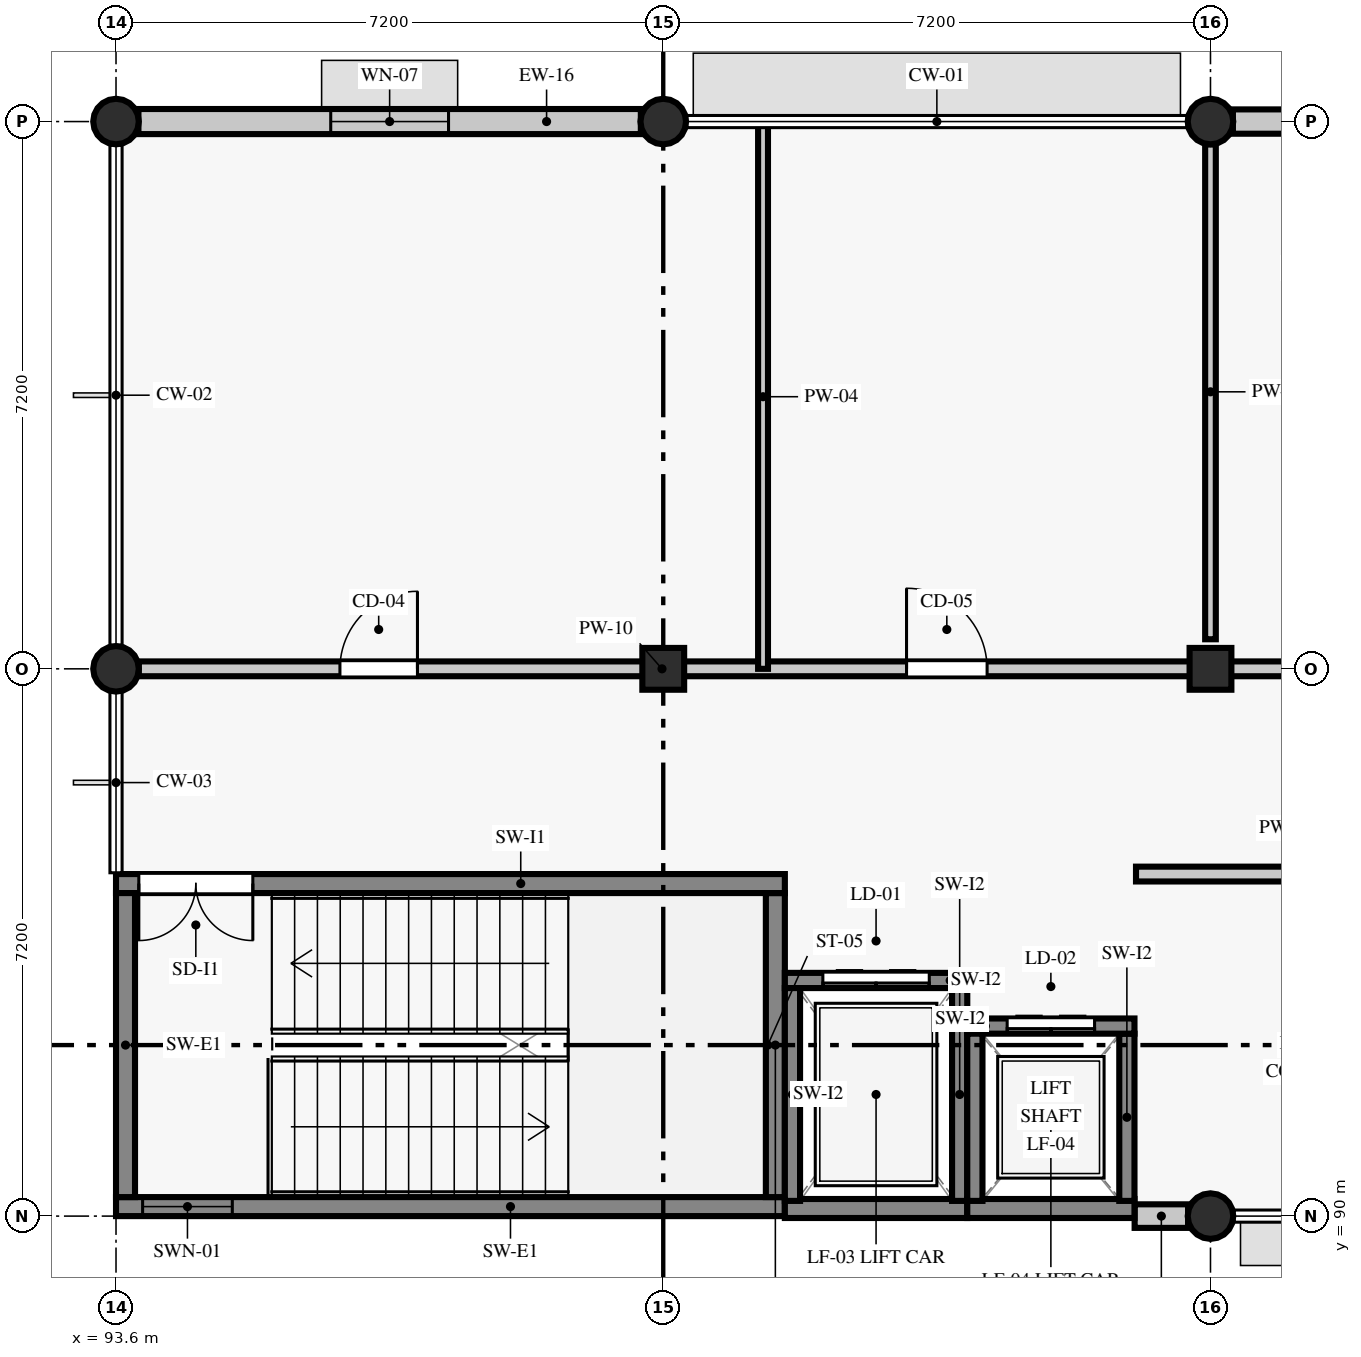
"""IFC4 building model, lengths in metres.
Left out: names, types, materials, properties, quantities, classifications, styles, units other than length and angle.
Written with IfcOpenShell. Run it as: python <this file> out.ifc"""

import sys

from ifc_helpers import new_model, si_unit, direction, frame, frame_2d, origin, origin_2d, place, context, subcontext, project, spatial, rectangle, circle, extrude, element, fill, save


model = new_model("IFC4")
c1 = context("Model", 3, precision=1e-05, world=origin(), true_north=direction((0.0, 1.0)))
c2 = subcontext(c1, "Body", "Model", "MODEL_VIEW")
j1 = project(units=[si_unit("LENGTHUNIT", "METRE"), si_unit("PLANEANGLEUNIT", "RADIAN")], contexts=[c1])
p1 = place(None, origin())
s1 = spatial("IfcSite", under=j1, at=p1, CompositionType="ELEMENT")
p2 = place(p1, origin())
s2 = spatial("IfcBuilding", under=s1, at=p2, CompositionType="ELEMENT")
p3 = place(p2, frame((0.0, 0.0, 18.0)))
s3 = spatial("IfcBuildingStorey", under=s2, at=p3, CompositionType="ELEMENT", Elevation=18.0)
for number, where, z_axis, x_axis in (
    (1, (93.6, 97.2, 0.0), (0.0, 0.0, 1.0), (1.0, 0.0, 0.0)),
    (2, (93.6, 104.4, 0.0), (0.0, 0.0, 1.0), (1.0, 0.0, 0.0)),
):
    element("IfcColumn", number, at=place(p3, frame(where, z_axis=z_axis, x_axis=x_axis)), inside=s3, PredefinedType="COLUMN", context=c2, shape_type="SweptSolid", body=[
        extrude(circle(Radius=0.3, at=origin_2d()), origin(), (0.0, 0.0, 1.0), 3.915),
    ])
p4 = place(p3, frame((100.8, 97.2, 0.0), z_axis=(0.0, 0.0, 1.0), x_axis=(1.0, 0.0, 0.0)))
e3 = element("IfcColumn", 3, at=p4, inside=s3, PredefinedType="COLUMN", context=c2, shape_type="SweptSolid", body=[
    extrude(rectangle(XDim=0.55, YDim=0.55, at=origin_2d()), origin(), (0.0, 0.0, 1.0), 3.915),
])
for number, where, z_axis, x_axis in (
    (4, (100.8, 104.4, 0.0), (0.0, 0.0, 1.0), (1.0, 0.0, 0.0)),
    (5, (108.0, 90.0, 0.0), (0.0, 0.0, 1.0), (1.0, 0.0, 0.0)),
):
    element("IfcColumn", number, at=place(p3, frame(where, z_axis=z_axis, x_axis=x_axis)), inside=s3, PredefinedType="COLUMN", context=c2, shape_type="SweptSolid", body=[
        extrude(circle(Radius=0.3, at=origin_2d()), origin(), (0.0, 0.0, 1.0), 3.915),
    ])
p5 = place(p3, frame((108.0, 97.2, 0.0), z_axis=(0.0, 0.0, 1.0), x_axis=(1.0, 0.0, 0.0)))
e6 = element("IfcColumn", 6, at=p5, inside=s3, PredefinedType="COLUMN", context=c2, shape_type="SweptSolid", body=[
    extrude(rectangle(XDim=0.55, YDim=0.55, at=origin_2d()), origin(), (0.0, 0.0, 1.0), 3.915),
])
p6 = place(p3, frame((108.0, 104.4, 0.0), z_axis=(0.0, 0.0, 1.0), x_axis=(1.0, 0.0, 0.0)))
e7 = element("IfcColumn", 7, at=p6, inside=s3, PredefinedType="COLUMN", context=c2, shape_type="SweptSolid", body=[
    extrude(circle(Radius=0.3, at=origin_2d()), origin(), (0.0, 0.0, 1.0), 3.915),
])
p7 = place(p3, frame((107.002, 90.0, 0.0), z_axis=(0.0, 0.0, 1.0), x_axis=(1.0, 0.0, 0.0)))
e8 = element("IfcWall", 8, at=p7, inside=s3, PredefinedType="STANDARD", context=c2, shape_type="SweptSolid", body=[
    extrude(rectangle(XDim=0.703, YDim=0.31, at=frame_2d((0.352, 0.0))), origin(), (0.0, 0.0, 1.0), 3.915),
])
p8 = place(p3, frame((114.905, 104.4, 0.0), z_axis=(0.0, 0.0, 1.0), x_axis=(-1.0, 0.0, 0.0)))
e9 = element("IfcWall", 9, at=p8, inside=s3, PredefinedType="STANDARD", context=c2, shape_type="SweptSolid", body=[
    extrude(rectangle(XDim=6.61, YDim=0.32, at=frame_2d((3.305, 0.0))), origin(), (0.0, 0.0, 1.0), 3.265),
])
p9 = place(p8, frame((3.03, 0.0, 0.9)))
e10 = element("IfcOpeningElement", 10, at=p9, cuts=e9, PredefinedType="OPENING", context=c2, shape_type="SweptSolid", body=[
    extrude(rectangle(XDim=1.45, YDim=1.3, at=frame_2d((0.725, 0.65))), frame((0.0, 0.17, 0.0), z_axis=(0.0, -1.0, 0.0), x_axis=(1.0, 0.0, 0.0)), (0.0, 0.0, 1.0), 0.34),
])
p10 = place(p3, frame((100.505, 104.4, 0.0), z_axis=(0.0, 0.0, 1.0), x_axis=(-1.0, 0.0, 0.0)))
e11 = element("IfcWall", 11, at=p10, inside=s3, PredefinedType="STANDARD", context=c2, shape_type="SweptSolid", body=[
    extrude(rectangle(XDim=6.61, YDim=0.33, at=frame_2d((3.305, 0.0))), origin(), (0.0, 0.0, 1.0), 3.265),
])
p11 = place(p10, frame((2.53, 0.0, 0.9)))
e12 = element("IfcOpeningElement", 12, at=p11, cuts=e11, PredefinedType="OPENING", context=c2, shape_type="SweptSolid", body=[
    extrude(rectangle(XDim=1.55, YDim=1.3, at=frame_2d((0.775, 0.65))), frame((0.0, 0.175, 0.0), z_axis=(0.0, -1.0, 0.0), x_axis=(1.0, 0.0, 0.0)), (0.0, 0.0, 1.0), 0.35),
])
p12 = place(p3, frame((93.6, 90.125, 0.0), z_axis=(0.0, 0.0, 1.0), x_axis=(1.0, 0.0, 0.0)))
e13 = element("IfcWall", 13, at=p12, inside=s3, PredefinedType="SHEAR", context=c2, shape_type="SweptSolid", body=[
    extrude(rectangle(XDim=8.8, YDim=0.25, at=frame_2d((4.4, 0.0))), origin(), (0.0, 0.0, 1.0), 3.915),
])
p13 = place(p12, frame((0.35, 0.0, 0.92)))
e14 = element("IfcOpeningElement", 14, at=p13, cuts=e13, PredefinedType="OPENING", context=c2, shape_type="SweptSolid", body=[
    extrude(rectangle(XDim=1.18, YDim=1.48, at=frame_2d((0.59, 0.74))), frame((0.0, 0.135, 0.0), z_axis=(0.0, -1.0, 0.0), x_axis=(1.0, 0.0, 0.0)), (0.0, 0.0, 1.0), 0.27),
])
p14 = place(p3, frame((102.275, 90.25, 0.0), z_axis=(0.0, 0.0, 1.0), x_axis=(0.0, 1.0, 0.0)))
e15 = element("IfcWall", 15, at=p14, inside=s3, PredefinedType="SHEAR", context=c2, shape_type="SweptSolid", body=[
    extrude(rectangle(XDim=4.0, YDim=0.25, at=frame_2d((2.0, 0.0))), origin(), (0.0, 0.0, 1.0), 3.915),
])
p15 = place(p3, frame((102.4, 94.375, 0.0), z_axis=(0.0, 0.0, 1.0), x_axis=(-1.0, 0.0, 0.0)))
e16 = element("IfcWall", 16, at=p15, inside=s3, PredefinedType="SHEAR", context=c2, shape_type="SweptSolid", body=[
    extrude(rectangle(XDim=8.8, YDim=0.25, at=frame_2d((4.4, 0.0))), origin(), (0.0, 0.0, 1.0), 3.915),
])
p16 = place(p15, frame((7.0, 0.0, 0.0)))
e17 = element("IfcOpeningElement", 17, at=p16, cuts=e16, PredefinedType="OPENING", context=c2, shape_type="SweptSolid", body=[
    extrude(rectangle(XDim=1.5, YDim=2.15, at=frame_2d((0.75, 1.075))), frame((0.0, 0.135, 0.0), z_axis=(0.0, -1.0, 0.0), x_axis=(1.0, 0.0, 0.0)), (0.0, 0.0, 1.0), 0.27),
])
p17 = place(p3, frame((93.725, 94.25, 0.0), z_axis=(0.0, 0.0, 1.0), x_axis=(0.0, -1.0, 0.0)))
e18 = element("IfcWall", 18, at=p17, inside=s3, PredefinedType="SHEAR", context=c2, shape_type="SweptSolid", body=[
    extrude(rectangle(XDim=4.0, YDim=0.25, at=frame_2d((2.0, 0.0))), origin(), (0.0, 0.0, 1.0), 3.915),
])
p18 = place(p3, frame((102.4, 90.1, 0.0), z_axis=(0.0, 0.0, 1.0), x_axis=(1.0, 0.0, 0.0)))
e19 = element("IfcWall", 19, at=p18, inside=s3, PredefinedType="SHEAR", context=c2, shape_type="SweptSolid", body=[
    extrude(rectangle(XDim=2.4, YDim=0.25, at=frame_2d((1.2, 0.0))), origin(), (0.0, 0.0, 1.0), 3.915),
])
p19 = place(p3, frame((104.7, 90.2, 0.0), z_axis=(0.0, 0.0, 1.0), x_axis=(0.0, 1.0, 0.0)))
e20 = element("IfcWall", 20, at=p19, inside=s3, PredefinedType="SHEAR", context=c2, shape_type="SweptSolid", body=[
    extrude(rectangle(XDim=2.8, YDim=0.2, at=frame_2d((1.4, 0.0))), origin(), (0.0, 0.0, 1.0), 3.915),
])
p20 = place(p3, frame((104.8, 93.1, 0.0), z_axis=(0.0, 0.0, 1.0), x_axis=(-1.0, 0.0, 0.0)))
e21 = element("IfcWall", 21, at=p20, inside=s3, PredefinedType="SHEAR", context=c2, shape_type="SweptSolid", body=[
    extrude(rectangle(XDim=2.4, YDim=0.2, at=frame_2d((1.2, 0.0))), origin(), (0.0, 0.0, 1.0), 3.915),
])
p21 = place(p20, frame((0.5, 0.0, 0.0)))
e22 = element("IfcOpeningElement", 22, at=p21, cuts=e21, PredefinedType="OPENING", context=c2, shape_type="SweptSolid", body=[
    extrude(rectangle(XDim=1.4, YDim=2.15, at=frame_2d((0.7, 1.075))), frame((0.0, 0.11, 0.0), z_axis=(0.0, -1.0, 0.0), x_axis=(1.0, 0.0, 0.0)), (0.0, 0.0, 1.0), 0.22),
])
p22 = place(p3, frame((102.5, 93.0, 0.0), z_axis=(0.0, 0.0, 1.0), x_axis=(0.0, -1.0, 0.0)))
e23 = element("IfcWall", 23, at=p22, inside=s3, PredefinedType="SHEAR", context=c2, shape_type="SweptSolid", body=[
    extrude(rectangle(XDim=2.8, YDim=0.2, at=frame_2d((1.4, 0.0))), origin(), (0.0, 0.0, 1.0), 3.915),
])
p23 = place(p3, frame((104.8, 90.1, 0.0), z_axis=(0.0, 0.0, 1.0), x_axis=(1.0, 0.0, 0.0)))
e24 = element("IfcWall", 24, at=p23, inside=s3, PredefinedType="SHEAR", context=c2, shape_type="SweptSolid", body=[
    extrude(rectangle(XDim=2.2, YDim=0.25, at=frame_2d((1.1, 0.0))), origin(), (0.0, 0.0, 1.0), 3.915),
])
p24 = place(p3, frame((106.9, 90.2, 0.0), z_axis=(0.0, 0.0, 1.0), x_axis=(0.0, 1.0, 0.0)))
e25 = element("IfcWall", 25, at=p24, inside=s3, PredefinedType="SHEAR", context=c2, shape_type="SweptSolid", body=[
    extrude(rectangle(XDim=2.2, YDim=0.2, at=frame_2d((1.1, 0.0))), origin(), (0.0, 0.0, 1.0), 3.915),
])
p25 = place(p3, frame((107.0, 92.5, 0.0), z_axis=(0.0, 0.0, 1.0), x_axis=(-1.0, 0.0, 0.0)))
e26 = element("IfcWall", 26, at=p25, inside=s3, PredefinedType="SHEAR", context=c2, shape_type="SweptSolid", body=[
    extrude(rectangle(XDim=2.2, YDim=0.2, at=frame_2d((1.1, 0.0))), origin(), (0.0, 0.0, 1.0), 3.915),
])
p26 = place(p25, frame((0.525, 0.0, 0.0)))
e27 = element("IfcOpeningElement", 27, at=p26, cuts=e26, PredefinedType="OPENING", context=c2, shape_type="SweptSolid", body=[
    extrude(rectangle(XDim=1.15, YDim=2.15, at=frame_2d((0.575, 1.075))), frame((0.0, 0.11, 0.0), z_axis=(0.0, -1.0, 0.0), x_axis=(1.0, 0.0, 0.0)), (0.0, 0.0, 1.0), 0.22),
])
p27 = place(p3, frame((104.9, 92.4, 0.0), z_axis=(0.0, 0.0, 1.0), x_axis=(0.0, -1.0, 0.0)))
e28 = element("IfcWall", 28, at=p27, inside=s3, PredefinedType="SHEAR", context=c2, shape_type="SweptSolid", body=[
    extrude(rectangle(XDim=2.2, YDim=0.2, at=frame_2d((1.1, 0.0))), origin(), (0.0, 0.0, 1.0), 3.915),
])
p28 = place(p3, frame((93.9, 97.2, 0.0), z_axis=(0.0, 0.0, 1.0), x_axis=(1.0, 0.0, 0.0)))
e29 = element("IfcWall", 29, at=p28, inside=s3, PredefinedType="PARTITIONING", context=c2, shape_type="SweptSolid", body=[
    extrude(rectangle(XDim=28.2, YDim=0.195, at=frame_2d((14.1, 0.0))), origin(), (0.0, 0.0, 1.0), 3.165),
])
p29 = place(p28, frame((2.646, 0.0, 0.0)))
e30 = element("IfcOpeningElement", 30, at=p29, cuts=e29, PredefinedType="OPENING", context=c2, shape_type="SweptSolid", body=[
    extrude(rectangle(XDim=1.02, YDim=2.08, at=frame_2d((0.51, 1.04))), frame((0.0, 0.107, 0.0), z_axis=(0.0, -1.0, 0.0), x_axis=(1.0, 0.0, 0.0)), (0.0, 0.0, 1.0), 0.215),
])
p30 = place(p28, frame((10.101, 0.0, 0.0)))
e31 = element("IfcOpeningElement", 31, at=p30, cuts=e29, PredefinedType="OPENING", context=c2, shape_type="SweptSolid", body=[
    extrude(rectangle(XDim=1.06, YDim=2.08, at=frame_2d((0.53, 1.04))), frame((0.0, 0.107, 0.0), z_axis=(0.0, -1.0, 0.0), x_axis=(1.0, 0.0, 0.0)), (0.0, 0.0, 1.0), 0.215),
])
p31 = place(p28, frame((15.07, 0.0, 0.0)))
e32 = element("IfcOpeningElement", 32, at=p31, cuts=e29, PredefinedType="OPENING", context=c2, shape_type="SweptSolid", body=[
    extrude(rectangle(XDim=0.94, YDim=2.08, at=frame_2d((0.47, 1.04))), frame((0.0, 0.107, 0.0), z_axis=(0.0, -1.0, 0.0), x_axis=(1.0, 0.0, 0.0)), (0.0, 0.0, 1.0), 0.215),
])
p32 = place(p28, frame((17.26, 0.0, 0.0)))
e33 = element("IfcOpeningElement", 33, at=p32, cuts=e29, PredefinedType="OPENING", context=c2, shape_type="SweptSolid", body=[
    extrude(rectangle(XDim=0.9, YDim=2.08, at=frame_2d((0.45, 1.04))), frame((0.0, 0.107, 0.0), z_axis=(0.0, -1.0, 0.0), x_axis=(1.0, 0.0, 0.0)), (0.0, 0.0, 1.0), 0.215),
])
p33 = place(p28, frame((19.49, 0.0, 0.0)))
e34 = element("IfcOpeningElement", 34, at=p33, cuts=e29, PredefinedType="OPENING", context=c2, shape_type="SweptSolid", body=[
    extrude(rectangle(XDim=0.9, YDim=2.13, at=frame_2d((0.45, 1.065))), frame((0.0, 0.107, 0.0), z_axis=(0.0, -1.0, 0.0), x_axis=(1.0, 0.0, 0.0)), (0.0, 0.0, 1.0), 0.215),
])
p34 = place(p28, frame((24.357, 0.0, 0.0)))
e35 = element("IfcOpeningElement", 35, at=p34, cuts=e29, PredefinedType="OPENING", context=c2, shape_type="SweptSolid", body=[
    extrude(rectangle(XDim=1.0, YDim=2.13, at=frame_2d((0.5, 1.065))), frame((0.0, 0.107, 0.0), z_axis=(0.0, -1.0, 0.0), x_axis=(1.0, 0.0, 0.0)), (0.0, 0.0, 1.0), 0.215),
])
p35 = place(p3, frame((102.113, 97.2, 0.0), z_axis=(0.0, 0.0, 1.0), x_axis=(0.0, 1.0, 0.0)))
e36 = element("IfcWall", 36, at=p35, inside=s3, PredefinedType="PARTITIONING", context=c2, shape_type="SweptSolid", body=[
    extrude(rectangle(XDim=7.16, YDim=0.13, at=frame_2d((3.58, 0.0))), origin(), (0.0, 0.0, 1.0), 3.165),
])
p36 = place(p3, frame((108.0, 97.589, 0.0), z_axis=(0.0, 0.0, 1.0), x_axis=(0.0, 1.0, 0.0)))
e37 = element("IfcWall", 37, at=p36, inside=s3, PredefinedType="PARTITIONING", context=c2, shape_type="SweptSolid", body=[
    extrude(rectangle(XDim=6.511, YDim=0.14, at=frame_2d((3.256, 0.0))), origin(), (0.0, 0.0, 1.0), 3.365),
])
p37 = place(p3, frame((107.02, 94.5, 0.0), z_axis=(0.0, 0.0, 1.0), x_axis=(1.0, 0.0, 0.0)))
e38 = element("IfcWall", 38, at=p37, inside=s3, PredefinedType="PARTITIONING", context=c2, shape_type="SweptSolid", body=[
    extrude(rectangle(XDim=6.56, YDim=0.195, at=frame_2d((3.28, 0.0))), origin(), (0.0, 0.0, 1.0), 3.365),
])
p38 = place(p37, frame((3.995, 0.0, 0.0)))
e39 = element("IfcOpeningElement", 39, at=p38, cuts=e38, PredefinedType="OPENING", context=c2, shape_type="SweptSolid", body=[
    extrude(rectangle(XDim=1.05, YDim=2.13, at=frame_2d((0.525, 1.065))), frame((0.0, 0.107, 0.0), z_axis=(0.0, -1.0, 0.0), x_axis=(1.0, 0.0, 0.0)), (0.0, 0.0, 1.0), 0.215),
])
p39 = place(p11, origin())
e40 = element("IfcWindow", 40, at=p39, inside=s3, PartitioningType="SINGLE_PANEL", PredefinedType="WINDOW", context=c2, shape_type="SweptSolid", body=[
    extrude(rectangle(XDim=1.55, YDim=1.3, at=frame_2d((0.775, 0.65))), frame((0.0, 0.03, 0.0), z_axis=(0.0, -1.0, 0.0), x_axis=(1.0, 0.0, 0.0)), (0.0, 0.0, 1.0), 0.06),
])
fill(e12, e40)
p40 = place(p13, origin())
e41 = element("IfcWindow", 41, at=p40, inside=s3, PartitioningType="SINGLE_PANEL", PredefinedType="WINDOW", context=c2, shape_type="SweptSolid", body=[
    extrude(rectangle(XDim=1.18, YDim=1.48, at=frame_2d((0.59, 0.74))), frame((0.0, 0.03, 0.0), z_axis=(0.0, -1.0, 0.0), x_axis=(1.0, 0.0, 0.0)), (0.0, 0.0, 1.0), 0.06),
])
fill(e14, e41)
p41 = place(p16, origin())
e42 = element("IfcDoor", 42, at=p41, inside=s3, OperationType="DOUBLE_DOOR_SINGLE_SWING", PredefinedType="DOOR", context=c2, shape_type="SweptSolid", body=[
    extrude(rectangle(XDim=1.5, YDim=2.15, at=frame_2d((0.75, 1.075))), frame((0.0, 0.025, 0.0), z_axis=(0.0, -1.0, 0.0), x_axis=(1.0, 0.0, 0.0)), (0.0, 0.0, 1.0), 0.05),
])
fill(e17, e42)
p42 = place(p21, frame((1.4, 0.0, 0.0), z_axis=(0.0, 0.0, 1.0), x_axis=(-1.0, 0.0, 0.0)))
e43 = element("IfcDoor", 43, at=p42, inside=s3, OperationType="DOUBLE_DOOR_SLIDING", PredefinedType="DOOR", context=c2, shape_type="SweptSolid", body=[
    extrude(rectangle(XDim=1.4, YDim=2.15, at=frame_2d((0.7, 1.075))), frame((0.0, 0.025, 0.0), z_axis=(0.0, -1.0, 0.0), x_axis=(1.0, 0.0, 0.0)), (0.0, 0.0, 1.0), 0.05),
])
fill(e22, e43)
p43 = place(p26, frame((1.15, 0.0, 0.0), z_axis=(0.0, 0.0, 1.0), x_axis=(-1.0, 0.0, 0.0)))
e44 = element("IfcDoor", 44, at=p43, inside=s3, OperationType="DOUBLE_DOOR_SLIDING", PredefinedType="DOOR", context=c2, shape_type="SweptSolid", body=[
    extrude(rectangle(XDim=1.15, YDim=2.15, at=frame_2d((0.575, 1.075))), frame((0.0, 0.025, 0.0), z_axis=(0.0, -1.0, 0.0), x_axis=(1.0, 0.0, 0.0)), (0.0, 0.0, 1.0), 0.05),
])
fill(e27, e44)
p44 = place(p29, origin())
e45 = element("IfcDoor", 45, at=p44, inside=s3, OperationType="SINGLE_SWING_RIGHT", PredefinedType="DOOR", context=c2, shape_type="SweptSolid", body=[
    extrude(rectangle(XDim=1.02, YDim=2.08, at=frame_2d((0.51, 1.04))), frame((0.0, 0.025, 0.0), z_axis=(0.0, -1.0, 0.0), x_axis=(1.0, 0.0, 0.0)), (0.0, 0.0, 1.0), 0.05),
])
fill(e30, e45)
p45 = place(p30, origin())
e46 = element("IfcDoor", 46, at=p45, inside=s3, OperationType="SINGLE_SWING_LEFT", PredefinedType="DOOR", context=c2, shape_type="SweptSolid", body=[
    extrude(rectangle(XDim=1.06, YDim=2.08, at=frame_2d((0.53, 1.04))), frame((0.0, 0.025, 0.0), z_axis=(0.0, -1.0, 0.0), x_axis=(1.0, 0.0, 0.0)), (0.0, 0.0, 1.0), 0.05),
])
fill(e31, e46)
save(model, sys.argv[1])
